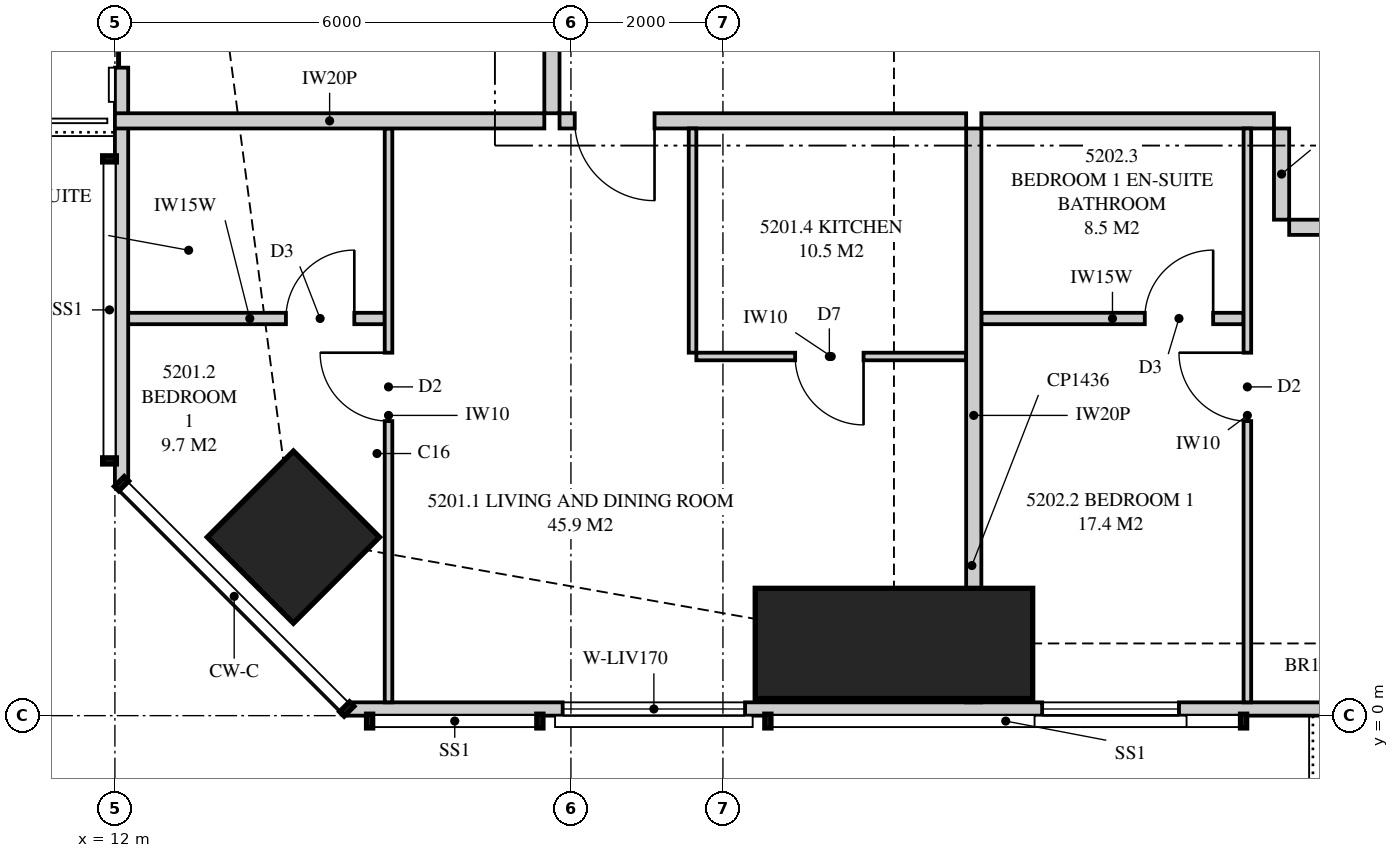
"""IFC4 building model, lengths in metres.
Left out: names, types, materials, properties, quantities, classifications, styles, units other than length and angle.
Written with IfcOpenShell. Run it as: python <this file> out.ifc"""

import sys

from ifc_helpers import new_model, si_unit, direction, frame, frame_2d, origin, origin_2d, place, context, subcontext, project, spatial, polyline, rectangle, outline, extrude, element, fill, save


model = new_model("IFC4")
c1 = context("Model", 3, precision=1e-05, world=origin(), true_north=direction((0.0, 1.0)))
c2 = subcontext(c1, "Body", "Model", "MODEL_VIEW")
j1 = project(units=[si_unit("LENGTHUNIT", "METRE"), si_unit("PLANEANGLEUNIT", "RADIAN")], contexts=[c1])
p1 = place(None, origin())
s1 = spatial("IfcSite", under=j1, at=p1, CompositionType="ELEMENT")
p2 = place(p1, origin())
s2 = spatial("IfcBuilding", under=s1, at=p2, CompositionType="ELEMENT")
p3 = place(p2, frame((0.0, 0.0, 191.2)))
s3 = spatial("IfcBuildingStorey", under=s2, at=p3, CompositionType="ELEMENT", Elevation=191.2)
p4 = place(p3, frame((14.348, 2.348, 0.0), z_axis=(0.0, 0.0, 1.0), x_axis=(0.707106781187, 0.707106781187, 0.0)))
e1 = element("IfcColumn", 1, at=p4, inside=s3, PredefinedType="COLUMN", context=c2, shape_type="SweptSolid", body=[
    extrude(rectangle(XDim=1.6, YDim=1.6, at=origin_2d()), origin(), (0.0, 0.0, 1.0), 3.35),
])
p5 = place(p3, frame((22.25, 0.95, 0.0), z_axis=(0.0, 0.0, 1.0), x_axis=(0.0, 1.0, 0.0)))
e2 = element("IfcColumn", 2, at=p5, inside=s3, PredefinedType="COLUMN", context=c2, shape_type="SweptSolid", body=[
    extrude(rectangle(XDim=1.45, YDim=3.65, at=origin_2d()), origin(), (0.0, 0.0, 1.0), 3.35),
])
p6 = place(p3, frame((15.051, 0.087, 0.0), z_axis=(0.0, 0.0, 1.0), x_axis=(1.0, 0.0, 0.0)))
e3 = element("IfcWall", 3, at=p6, inside=s3, PredefinedType="SOLIDWALL", context=c2, shape_type="SweptSolid", body=[
    extrude(outline(polyline([(0.0, 0.0), (34.897, 0.0), (34.897, 3.11), (27.91, 3.11), (27.91, 2.15), (27.836, 2.15), (27.836, 3.11), (27.699, 3.11), (27.699, 2.15), (7.199, 2.15), (7.199, 3.11), (7.062, 3.11), (7.062, 2.15), (6.987, 2.15), (6.987, 3.11), (0.0, 3.11), (0.0, 0.0)])), frame((0.0, 0.087, 0.0), z_axis=(0.0, -1.0, 0.0), x_axis=(1.0, 0.0, 0.0)), (0.0, 0.0, 1.0), 0.175),
])
p7 = place(p6, frame((2.84, 0.0, 0.4)))
e4 = element("IfcOpeningElement", 4, at=p7, cuts=e3, PredefinedType="OPENING", context=c2, shape_type="SweptSolid", body=[
    extrude(rectangle(XDim=2.4, YDim=1.7, at=frame_2d((1.2, 0.85))), frame((0.0, 0.097, 0.0), z_axis=(0.0, -1.0, 0.0), x_axis=(1.0, 0.0, 0.0)), (0.0, 0.0, 1.0), 0.195),
])
p8 = place(p6, frame((9.149, 0.0, 0.4)))
e5 = element("IfcOpeningElement", 5, at=p8, cuts=e3, PredefinedType="OPENING", context=c2, shape_type="SweptSolid", body=[
    extrude(rectangle(XDim=1.8, YDim=1.7, at=frame_2d((0.9, 0.85))), frame((0.0, 0.097, 0.0), z_axis=(0.0, -1.0, 0.0), x_axis=(1.0, 0.0, 0.0)), (0.0, 0.0, 1.0), 0.195),
])
p9 = place(p6, frame((13.561, 0.0, 0.0)))
e6 = element("IfcOpeningElement", 6, at=p9, cuts=e3, PredefinedType="OPENING", context=c2, shape_type="SweptSolid", body=[
    extrude(rectangle(XDim=1.8, YDim=2.1, at=frame_2d((0.9, 1.05))), frame((0.0, 0.097, 0.0), z_axis=(0.0, -1.0, 0.0), x_axis=(1.0, 0.0, 0.0)), (0.0, 0.0, 1.0), 0.195),
])
p10 = place(p6, frame((19.849, 0.0, 0.4)))
e7 = element("IfcOpeningElement", 7, at=p10, cuts=e3, PredefinedType="OPENING", context=c2, shape_type="SweptSolid", body=[
    extrude(rectangle(XDim=1.8, YDim=1.7, at=frame_2d((0.9, 0.85))), frame((0.0, 0.097, 0.0), z_axis=(0.0, -1.0, 0.0), x_axis=(1.0, 0.0, 0.0)), (0.0, 0.0, 1.0), 0.195),
])
p11 = place(p6, frame((23.449, 0.0, 0.4)))
e8 = element("IfcOpeningElement", 8, at=p11, cuts=e3, PredefinedType="OPENING", context=c2, shape_type="SweptSolid", body=[
    extrude(rectangle(XDim=1.8, YDim=1.7, at=frame_2d((0.9, 0.85))), frame((0.0, 0.097, 0.0), z_axis=(0.0, -1.0, 0.0), x_axis=(1.0, 0.0, 0.0)), (0.0, 0.0, 1.0), 0.195),
])
p12 = place(p6, frame((29.636, 0.0, 0.4)))
e9 = element("IfcOpeningElement", 9, at=p12, cuts=e3, PredefinedType="OPENING", context=c2, shape_type="SweptSolid", body=[
    extrude(rectangle(XDim=1.8, YDim=1.7, at=frame_2d((0.9, 0.85))), frame((0.0, 0.097, 0.0), z_axis=(0.0, -1.0, 0.0), x_axis=(1.0, 0.0, 0.0)), (0.0, 0.0, 1.0), 0.195),
])
p13 = place(p6, frame((32.56, 0.0, 0.4)))
e10 = element("IfcOpeningElement", 10, at=p13, cuts=e3, PredefinedType="OPENING", context=c2, shape_type="SweptSolid", body=[
    extrude(rectangle(XDim=1.8, YDim=1.7, at=frame_2d((0.9, 0.85))), frame((0.0, 0.097, 0.0), z_axis=(0.0, -1.0, 0.0), x_axis=(1.0, 0.0, 0.0)), (0.0, 0.0, 1.0), 0.195),
])
p14 = place(p3, frame((12.087, 32.949, 0.0), z_axis=(0.0, 0.0, 1.0), x_axis=(0.0, -1.0, 0.0)))
e11 = element("IfcWall", 11, at=p14, inside=s3, PredefinedType="SOLIDWALL", context=c2, shape_type="SweptSolid", body=[
    extrude(outline(polyline([(0.0, 0.0), (29.897, 0.0), (29.897, 3.11), (20.191, 3.11), (20.191, 2.15), (20.051, 2.15), (20.051, 3.11), (19.949, 3.11), (19.949, 2.15), (7.949, 2.15), (7.949, 3.11), (7.823, 3.11), (7.823, 2.15), (7.73, 2.15), (7.73, 3.11), (0.0, 3.11), (0.0, 0.0)])), frame((0.0, 0.087, 0.0), z_axis=(0.0, -1.0, 0.0), x_axis=(1.0, 0.0, 0.0)), (0.0, 0.0, 1.0), 0.175),
])
p15 = place(p14, frame((1.599, 0.0, 0.4)))
e12 = element("IfcOpeningElement", 12, at=p15, cuts=e11, PredefinedType="OPENING", context=c2, shape_type="SweptSolid", body=[
    extrude(rectangle(XDim=1.2, YDim=1.7, at=frame_2d((0.6, 0.85))), frame((0.0, 0.097, 0.0), z_axis=(0.0, -1.0, 0.0), x_axis=(1.0, 0.0, 0.0)), (0.0, 0.0, 1.0), 0.195),
])
p16 = place(p14, frame((9.899, 0.0, 0.4)))
e13 = element("IfcOpeningElement", 13, at=p16, cuts=e11, PredefinedType="OPENING", context=c2, shape_type="SweptSolid", body=[
    extrude(rectangle(XDim=1.8, YDim=1.7, at=frame_2d((0.9, 0.85))), frame((0.0, 0.097, 0.0), z_axis=(0.0, -1.0, 0.0), x_axis=(1.0, 0.0, 0.0)), (0.0, 0.0, 1.0), 0.195),
])
p17 = place(p14, frame((13.024, 0.0, 0.4)))
e14 = element("IfcOpeningElement", 14, at=p17, cuts=e11, PredefinedType="OPENING", context=c2, shape_type="SweptSolid", body=[
    extrude(rectangle(XDim=1.8, YDim=1.7, at=frame_2d((0.9, 0.85))), frame((0.0, 0.097, 0.0), z_axis=(0.0, -1.0, 0.0), x_axis=(1.0, 0.0, 0.0)), (0.0, 0.0, 1.0), 0.195),
])
p18 = place(p14, frame((16.201, 0.0, 0.4)))
e15 = element("IfcOpeningElement", 15, at=p18, cuts=e11, PredefinedType="OPENING", context=c2, shape_type="SweptSolid", body=[
    extrude(rectangle(XDim=1.8, YDim=1.7, at=frame_2d((0.9, 0.85))), frame((0.0, 0.097, 0.0), z_axis=(0.0, -1.0, 0.0), x_axis=(1.0, 0.0, 0.0)), (0.0, 0.0, 1.0), 0.195),
])
p19 = place(p14, frame((22.624, 0.0, 0.0)))
e16 = element("IfcOpeningElement", 16, at=p19, cuts=e11, PredefinedType="OPENING", context=c2, shape_type="SweptSolid", body=[
    extrude(rectangle(XDim=1.8, YDim=2.1, at=frame_2d((0.9, 1.05))), frame((0.0, 0.097, 0.0), z_axis=(0.0, -1.0, 0.0), x_axis=(1.0, 0.0, 0.0)), (0.0, 0.0, 1.0), 0.195),
])
p20 = place(p3, frame((23.3, 0.175, 0.0), z_axis=(0.0, 0.0, 1.0), x_axis=(0.0, 1.0, 0.0)))
e17 = element("IfcWall", 17, at=p20, inside=s3, PredefinedType="PARTITIONING", context=c2, shape_type="SweptSolid", body=[
    extrude(outline(polyline([(0.529, 2.15), (0.0, 2.15), (0.0, 0.0), (0.529, 0.0), (0.529, 0.472), (1.021, 0.472), (1.021, 0.0), (7.55, 0.0), (7.55, 3.11), (1.685, 3.11), (1.685, 2.15), (1.021, 2.15), (1.021, 1.678), (0.529, 1.678), (0.529, 2.15)])), frame((0.0, 0.1, 0.0), z_axis=(0.0, -1.0, 0.0), x_axis=(1.0, 0.0, 0.0)), (0.0, 0.0, 1.0), 0.2),
])
p21 = place(p3, frame((17.85, 7.825, 0.0), z_axis=(0.0, 0.0, 1.0), x_axis=(1.0, 0.0, 0.0)))
e18 = element("IfcWall", 18, at=p21, inside=s3, PredefinedType="PARTITIONING", context=c2, shape_type="SweptSolid", body=[
    extrude(outline(polyline([(0.0, 0.0), (5.35, 0.0), (5.35, 3.11), (4.737, 3.11), (4.737, 2.541), (4.062, 2.541), (4.062, 3.11), (0.0, 3.11), (0.0, 0.0)])), frame((0.0, 0.1, 0.0), z_axis=(0.0, -1.0, 0.0), x_axis=(1.0, 0.0, 0.0)), (0.0, 0.0, 1.0), 0.2),
])
p22 = place(p21, frame((0.2, 0.0, 0.0)))
e19 = element("IfcOpeningElement", 19, at=p22, cuts=e18, PredefinedType="OPENING", context=c2, shape_type="SweptSolid", body=[
    extrude(rectangle(XDim=1.05, YDim=2.2, at=frame_2d((0.525, 1.1))), frame((0.0, 0.11, 0.0), z_axis=(0.0, -1.0, 0.0), x_axis=(1.0, 0.0, 0.0)), (0.0, 0.0, 1.0), 0.22),
])
p23 = place(p3, frame((15.6, 0.175, 0.0), z_axis=(0.0, 0.0, 1.0), x_axis=(0.0, 1.0, 0.0)))
e20 = element("IfcWall", 20, at=p23, inside=s3, PredefinedType="PARTITIONING", context=c2, shape_type="SweptSolid", body=[
    extrude(outline(polyline([(0.0, 0.0), (7.55, 0.0), (7.55, 3.11), (2.825, 3.11), (2.825, 2.15), (1.079, 2.15), (1.079, 3.11), (0.0, 3.11), (0.0, 0.0)])), frame((0.0, 0.05, 0.0), z_axis=(0.0, -1.0, 0.0), x_axis=(1.0, 0.0, 0.0)), (0.0, 0.0, 1.0), 0.1),
])
p24 = place(p23, frame((3.7, 0.0, 0.0)))
e21 = element("IfcOpeningElement", 21, at=p24, cuts=e20, PredefinedType="OPENING", context=c2, shape_type="SweptSolid", body=[
    extrude(rectangle(XDim=0.9, YDim=2.1, at=frame_2d((0.45, 1.05))), frame((0.0, 0.06, 0.0), z_axis=(0.0, -1.0, 0.0), x_axis=(1.0, 0.0, 0.0)), (0.0, 0.0, 1.0), 0.12),
])
p25 = place(p3, frame((12.0, 5.225, 0.0), z_axis=(0.0, 0.0, 1.0), x_axis=(1.0, 0.0, 0.0)))
e22 = element("IfcWall", 22, at=p25, inside=s3, PredefinedType="PLUMBINGWALL", context=c2, shape_type="SweptSolid", body=[
    extrude(outline(polyline([(0.0, 0.0), (3.55, 0.0), (3.55, 3.11), (2.863, 3.11), (2.863, 2.15), (1.078, 2.15), (1.078, 3.11), (0.0, 3.11), (0.0, 0.0)])), frame((0.0, 0.075, 0.0), z_axis=(0.0, -1.0, 0.0), x_axis=(1.0, 0.0, 0.0)), (0.0, 0.0, 1.0), 0.15),
])
p26 = place(p25, frame((2.25, 0.0, 0.0)))
e23 = element("IfcOpeningElement", 23, at=p26, cuts=e22, PredefinedType="OPENING", context=c2, shape_type="SweptSolid", body=[
    extrude(rectangle(XDim=0.9, YDim=2.1, at=frame_2d((0.45, 1.05))), frame((0.0, 0.085, 0.0), z_axis=(0.0, -1.0, 0.0), x_axis=(1.0, 0.0, 0.0)), (0.0, 0.0, 1.0), 0.17),
])
p27 = place(p3, frame((19.65, 4.725, 0.0), z_axis=(0.0, 0.0, 1.0), x_axis=(1.0, 0.0, 0.0)))
e24 = element("IfcWall", 24, at=p27, inside=s3, PredefinedType="PARTITIONING", context=c2, shape_type="SweptSolid", body=[
    extrude(outline(polyline([(0.0, 0.0), (3.55, 0.0), (3.55, 3.11), (2.887, 3.11), (2.887, 2.541), (2.312, 2.541), (2.312, 3.11), (0.0, 3.11), (0.0, 0.0)])), frame((0.0, 0.05, 0.0), z_axis=(0.0, -1.0, 0.0), x_axis=(1.0, 0.0, 0.0)), (0.0, 0.0, 1.0), 0.1),
])
p28 = place(p27, frame((1.3, 0.0, 0.0)))
e25 = element("IfcOpeningElement", 25, at=p28, cuts=e24, PredefinedType="OPENING", context=c2, shape_type="SweptSolid", body=[
    extrude(rectangle(XDim=0.9, YDim=2.1, at=frame_2d((0.45, 1.05))), frame((0.0, 0.06, 0.0), z_axis=(0.0, -1.0, 0.0), x_axis=(1.0, 0.0, 0.0)), (0.0, 0.0, 1.0), 0.12),
])
p29 = place(p3, frame((19.6, 4.775, 0.0), z_axis=(0.0, 0.0, 1.0), x_axis=(0.0, 1.0, 0.0)))
e26 = element("IfcWall", 26, at=p29, inside=s3, PredefinedType="PARTITIONING", context=c2, shape_type="SweptSolid", body=[
    extrude(rectangle(XDim=2.95, YDim=0.1, at=frame_2d((1.475, 0.0))), origin(), (0.0, 0.0, 1.0), 3.11),
])
p30 = place(p3, frame((23.4, 7.825, 0.0), z_axis=(0.0, 0.0, 1.0), x_axis=(1.0, 0.0, 0.0)))
e27 = element("IfcWall", 27, at=p30, inside=s3, PredefinedType="PARTITIONING", context=c2, shape_type="SweptSolid", body=[
    extrude(rectangle(XDim=3.85, YDim=0.2, at=frame_2d((1.925, 0.0))), origin(), (0.0, 0.0, 1.0), 3.11),
])
p31 = place(p3, frame((26.9, 0.175, 0.0), z_axis=(0.0, 0.0, 1.0), x_axis=(0.0, 1.0, 0.0)))
e28 = element("IfcWall", 28, at=p31, inside=s3, PredefinedType="PARTITIONING", context=c2, shape_type="SweptSolid", body=[
    extrude(outline(polyline([(0.0, 0.0), (7.55, 0.0), (7.55, 3.11), (1.635, 3.11), (1.635, 2.15), (0.0, 2.15), (0.0, 3.11), (0.0, 0.0)])), frame((0.0, 0.05, 0.0), z_axis=(0.0, -1.0, 0.0), x_axis=(1.0, 0.0, 0.0)), (0.0, 0.0, 1.0), 0.1),
])
p32 = place(p31, frame((3.7, 0.0, 0.0)))
e29 = element("IfcOpeningElement", 29, at=p32, cuts=e28, PredefinedType="OPENING", context=c2, shape_type="SweptSolid", body=[
    extrude(rectangle(XDim=0.9, YDim=2.1, at=frame_2d((0.45, 1.05))), frame((0.0, 0.06, 0.0), z_axis=(0.0, -1.0, 0.0), x_axis=(1.0, 0.0, 0.0)), (0.0, 0.0, 1.0), 0.12),
])
p33 = place(p3, frame((23.4, 5.225, 0.0), z_axis=(0.0, 0.0, 1.0), x_axis=(1.0, 0.0, 0.0)))
e30 = element("IfcWall", 30, at=p33, inside=s3, PredefinedType="PLUMBINGWALL", context=c2, shape_type="SweptSolid", body=[
    extrude(rectangle(XDim=3.45, YDim=0.15, at=frame_2d((1.725, 0.0))), origin(), (0.0, 0.0, 1.0), 3.11),
])
p34 = place(p33, frame((2.15, 0.0, 0.0)))
e31 = element("IfcOpeningElement", 31, at=p34, cuts=e30, PredefinedType="OPENING", context=c2, shape_type="SweptSolid", body=[
    extrude(rectangle(XDim=0.9, YDim=2.1, at=frame_2d((0.45, 1.05))), frame((0.0, 0.085, 0.0), z_axis=(0.0, -1.0, 0.0), x_axis=(1.0, 0.0, 0.0)), (0.0, 0.0, 1.0), 0.17),
])
p35 = place(p3, frame((12.0, 7.825, 0.0), z_axis=(0.0, 0.0, 1.0), x_axis=(1.0, 0.0, 0.0)))
e32 = element("IfcWall", 32, at=p35, inside=s3, PredefinedType="PARTITIONING", context=c2, shape_type="SweptSolid", body=[
    extrude(outline(polyline([(0.0, 0.0), (5.65, 0.0), (5.65, 3.11), (2.547, 3.11), (2.547, 2.15), (0.712, 2.15), (0.712, 3.11), (0.0, 3.11), (0.0, 0.0)])), frame((0.0, 0.1, 0.0), z_axis=(0.0, -1.0, 0.0), x_axis=(1.0, 0.0, 0.0)), (0.0, 0.0, 1.0), 0.2),
])
p36 = place(p3, frame((17.75, 7.925, 0.0), z_axis=(0.0, 0.0, 1.0), x_axis=(0.0, 1.0, 0.0)))
e33 = element("IfcWall", 33, at=p36, inside=s3, PredefinedType="PARTITIONING", context=c2, shape_type="SweptSolid", body=[
    extrude(outline(polyline([(0.0, 0.0), (21.15, 0.0), (21.15, 3.11), (17.412, 3.11), (17.412, 2.541), (16.738, 2.541), (16.738, 3.11), (5.412, 3.11), (5.412, 2.541), (4.738, 2.541), (4.738, 3.11), (0.0, 3.11), (0.0, 0.0)])), frame((0.0, 0.1, 0.0), z_axis=(0.0, -1.0, 0.0), x_axis=(1.0, 0.0, 0.0)), (0.0, 0.0, 1.0), 0.2),
])
p37 = place(p36, frame((16.25, 0.0, 0.0)))
e34 = element("IfcOpeningElement", 34, at=p37, cuts=e33, PredefinedType="OPENING", context=c2, shape_type="SweptSolid", body=[
    extrude(rectangle(XDim=1.05, YDim=2.2, at=frame_2d((0.525, 1.1))), frame((0.0, 0.11, 0.0), z_axis=(0.0, -1.0, 0.0), x_axis=(1.0, 0.0, 0.0)), (0.0, 0.0, 1.0), 0.22),
])
p38 = place(p3, frame((27.45, 6.425, 0.0), z_axis=(0.0, 0.0, 1.0), x_axis=(1.0, 0.0, 0.0)))
e35 = element("IfcWall", 35, at=p38, inside=s3, PredefinedType="PARTITIONING", context=c2, shape_type="SweptSolid", body=[
    extrude(rectangle(XDim=2.4, YDim=0.2, at=frame_2d((1.2, 0.0))), origin(), (0.0, 0.0, 1.0), 3.11),
])
p39 = place(p38, frame((0.7, 0.0, 0.0)))
e36 = element("IfcOpeningElement", 36, at=p39, cuts=e35, PredefinedType="OPENING", context=c2, shape_type="SweptSolid", body=[
    extrude(rectangle(XDim=1.05, YDim=2.2, at=frame_2d((0.525, 1.1))), frame((0.0, 0.11, 0.0), z_axis=(0.0, -1.0, 0.0), x_axis=(1.0, 0.0, 0.0)), (0.0, 0.0, 1.0), 0.22),
])
p40 = place(p3, frame((27.35, 7.725, 0.0), z_axis=(0.0, 0.0, 1.0), x_axis=(0.0, -1.0, 0.0)))
e37 = element("IfcWall", 37, at=p40, inside=s3, PredefinedType="PARTITIONING", context=c2, shape_type="SweptSolid", body=[
    extrude(rectangle(XDim=1.2, YDim=0.2, at=frame_2d((0.6, 0.0))), origin(), (0.0, 0.0, 1.0), 3.11),
])
p41 = place(p7, origin())
e38 = element("IfcWindow", 38, at=p41, inside=s3, PartitioningType="SINGLE_PANEL", PredefinedType="WINDOW", context=c2, shape_type="SweptSolid", body=[
    extrude(rectangle(XDim=2.4, YDim=1.7, at=frame_2d((1.2, 0.85))), frame((0.0, 0.03, 0.0), z_axis=(0.0, -1.0, 0.0), x_axis=(1.0, 0.0, 0.0)), (0.0, 0.0, 1.0), 0.06),
])
fill(e4, e38)
p42 = place(p8, origin())
e39 = element("IfcWindow", 39, at=p42, inside=s3, PartitioningType="SINGLE_PANEL", PredefinedType="WINDOW", context=c2, shape_type="SweptSolid", body=[
    extrude(rectangle(XDim=1.8, YDim=1.7, at=frame_2d((0.9, 0.85))), frame((0.0, 0.03, 0.0), z_axis=(0.0, -1.0, 0.0), x_axis=(1.0, 0.0, 0.0)), (0.0, 0.0, 1.0), 0.06),
])
fill(e5, e39)
p43 = place(p19, origin())
e40 = element("IfcDoor", 40, at=p43, inside=s3, OperationType="SLIDING_TO_LEFT", PredefinedType="DOOR", context=c2, shape_type="SweptSolid", body=[
    extrude(rectangle(XDim=1.8, YDim=2.1, at=frame_2d((0.9, 1.05))), frame((0.0, 0.025, 0.0), z_axis=(0.0, -1.0, 0.0), x_axis=(1.0, 0.0, 0.0)), (0.0, 0.0, 1.0), 0.05),
])
fill(e16, e40)
p44 = place(p22, frame((1.05, 0.0, 0.0), z_axis=(0.0, 0.0, 1.0), x_axis=(-1.0, 0.0, 0.0)))
e41 = element("IfcDoor", 41, at=p44, inside=s3, OperationType="SINGLE_SWING_LEFT", PredefinedType="DOOR", context=c2, shape_type="SweptSolid", body=[
    extrude(rectangle(XDim=1.05, YDim=2.2, at=frame_2d((0.525, 1.1))), frame((0.0, 0.025, 0.0), z_axis=(0.0, -1.0, 0.0), x_axis=(1.0, 0.0, 0.0)), (0.0, 0.0, 1.0), 0.05),
])
fill(e19, e41)
p45 = place(p24, origin())
e42 = element("IfcDoor", 42, at=p45, inside=s3, OperationType="SINGLE_SWING_RIGHT", PredefinedType="DOOR", context=c2, shape_type="SweptSolid", body=[
    extrude(rectangle(XDim=0.9, YDim=2.1, at=frame_2d((0.45, 1.05))), frame((0.0, 0.025, 0.0), z_axis=(0.0, -1.0, 0.0), x_axis=(1.0, 0.0, 0.0)), (0.0, 0.0, 1.0), 0.05),
])
fill(e21, e42)
p46 = place(p26, origin())
e43 = element("IfcDoor", 43, at=p46, inside=s3, OperationType="SINGLE_SWING_RIGHT", PredefinedType="DOOR", context=c2, shape_type="SweptSolid", body=[
    extrude(rectangle(XDim=0.9, YDim=2.1, at=frame_2d((0.45, 1.05))), frame((0.0, 0.025, 0.0), z_axis=(0.0, -1.0, 0.0), x_axis=(1.0, 0.0, 0.0)), (0.0, 0.0, 1.0), 0.05),
])
fill(e23, e43)
p47 = place(p28, frame((0.9, 0.0, 0.0), z_axis=(0.0, 0.0, 1.0), x_axis=(-1.0, 0.0, 0.0)))
e44 = element("IfcDoor", 44, at=p47, inside=s3, OperationType="SINGLE_SWING_LEFT", PredefinedType="DOOR", context=c2, shape_type="SweptSolid", body=[
    extrude(rectangle(XDim=0.9, YDim=2.1, at=frame_2d((0.45, 1.05))), frame((0.0, 0.025, 0.0), z_axis=(0.0, -1.0, 0.0), x_axis=(1.0, 0.0, 0.0)), (0.0, 0.0, 1.0), 0.05),
])
fill(e25, e44)
p48 = place(p32, origin())
e45 = element("IfcDoor", 45, at=p48, inside=s3, OperationType="SINGLE_SWING_RIGHT", PredefinedType="DOOR", context=c2, shape_type="SweptSolid", body=[
    extrude(rectangle(XDim=0.9, YDim=2.1, at=frame_2d((0.45, 1.05))), frame((0.0, 0.025, 0.0), z_axis=(0.0, -1.0, 0.0), x_axis=(1.0, 0.0, 0.0)), (0.0, 0.0, 1.0), 0.05),
])
fill(e29, e45)
p49 = place(p34, origin())
e46 = element("IfcDoor", 46, at=p49, inside=s3, OperationType="SINGLE_SWING_RIGHT", PredefinedType="DOOR", context=c2, shape_type="SweptSolid", body=[
    extrude(rectangle(XDim=0.9, YDim=2.1, at=frame_2d((0.45, 1.05))), frame((0.0, 0.025, 0.0), z_axis=(0.0, -1.0, 0.0), x_axis=(1.0, 0.0, 0.0)), (0.0, 0.0, 1.0), 0.05),
])
fill(e31, e46)
save(model, sys.argv[1])
